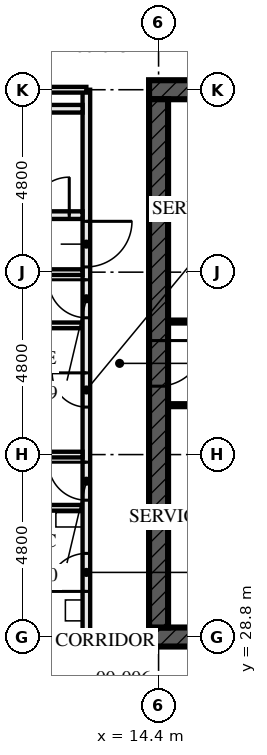
"""IFC4 building model, lengths in metres.
Left out: names, types, materials, properties, quantities, classifications, styles, units other than length and angle.
Written with IfcOpenShell. Run it as: python <this file> out.ifc"""

import sys

from ifc_helpers import new_model, si_unit, direction, frame, frame_2d, origin, place, context, subcontext, project, spatial, rectangle, extrude, element, fill, save


model = new_model("IFC4")
c1 = context("Model", 3, precision=1e-05, world=origin(), true_north=direction((0.0, 1.0)))
c2 = subcontext(c1, "Body", "Model", "MODEL_VIEW")
j1 = project(units=[si_unit("LENGTHUNIT", "METRE"), si_unit("PLANEANGLEUNIT", "RADIAN")], contexts=[c1])
p1 = place(None, origin())
s1 = spatial("IfcSite", under=j1, at=p1, CompositionType="ELEMENT")
p2 = place(p1, origin())
s2 = spatial("IfcBuilding", under=s1, at=p2, CompositionType="ELEMENT")
p3 = place(p2, origin())
s3 = spatial("IfcBuildingStorey", under=s2, at=p3, CompositionType="ELEMENT", Elevation=0.0)
p4 = place(p3, frame((14.15, 28.8, -1.8), z_axis=(0.0, 0.0, 1.0), x_axis=(1.0, 0.0, 0.0)))
e1 = element("IfcWall", 1, at=p4, inside=s3, PredefinedType="SHEAR", context=c2, shape_type="SweptSolid", body=[
    extrude(rectangle(XDim=14.9, YDim=0.5, at=frame_2d((7.45, 0.0))), origin(), (0.0, 0.0, 1.0), 6.13),
])
p5 = place(p4, frame((6.85, 0.0, 1.8)))
e2 = element("IfcOpeningElement", 2, at=p5, cuts=e1, PredefinedType="OPENING", context=c2, shape_type="SweptSolid", body=[
    extrude(rectangle(XDim=1.2, YDim=2.1, at=frame_2d((0.6, 1.05))), frame((0.0, 0.26, 0.0), z_axis=(0.0, -1.0, 0.0), x_axis=(1.0, 0.0, 0.0)), (0.0, 0.0, 1.0), 0.521),
])
p6 = place(p3, frame((29.05, 43.2, -1.8), z_axis=(0.0, 0.0, 1.0), x_axis=(-1.0, 0.0, 0.0)))
e3 = element("IfcWall", 3, at=p6, inside=s3, PredefinedType="SHEAR", context=c2, shape_type="SweptSolid", body=[
    extrude(rectangle(XDim=14.9, YDim=0.5, at=frame_2d((7.45, 0.0))), origin(), (0.0, 0.0, 1.0), 6.13),
])
p7 = place(p6, frame((6.85, 0.0, 1.8)))
e4 = element("IfcOpeningElement", 4, at=p7, cuts=e3, PredefinedType="OPENING", context=c2, shape_type="SweptSolid", body=[
    extrude(rectangle(XDim=1.2, YDim=2.1, at=frame_2d((0.6, 1.05))), frame((0.0, 0.26, 0.0), z_axis=(0.0, -1.0, 0.0), x_axis=(1.0, 0.0, 0.0)), (0.0, 0.0, 1.0), 0.521),
])
p8 = place(p3, frame((14.4, 42.95, -1.8), z_axis=(0.0, 0.0, 1.0), x_axis=(0.0, -1.0, 0.0)))
e5 = element("IfcWall", 5, at=p8, inside=s3, PredefinedType="SHEAR", context=c2, shape_type="SweptSolid", body=[
    extrude(rectangle(XDim=13.9, YDim=0.5, at=frame_2d((6.95, 0.0))), origin(), (0.0, 0.0, 1.0), 6.13),
])
p9 = place(p8, frame((6.35, 0.0, 1.8)))
e6 = element("IfcOpeningElement", 6, at=p9, cuts=e5, PredefinedType="OPENING", context=c2, shape_type="SweptSolid", body=[
    extrude(rectangle(XDim=1.2, YDim=2.1, at=frame_2d((0.6, 1.05))), frame((0.0, 0.26, 0.0), z_axis=(0.0, -1.0, 0.0), x_axis=(1.0, 0.0, 0.0)), (0.0, 0.0, 1.0), 0.521),
])
p10 = place(p3, frame((7.7, 42.7, 0.0), z_axis=(0.0, 0.0, 1.0), x_axis=(1.0, 0.0, 0.0)))
e7 = element("IfcWall", 7, at=p10, inside=s3, PredefinedType="SOLIDWALL", context=c2, shape_type="SweptSolid", body=[
    extrude(rectangle(XDim=4.7, YDim=0.2, at=frame_2d((2.35, 0.0))), origin(), (0.0, 0.0, 1.0), 3.99),
])
p11 = place(p3, frame((7.7, 39.9, 0.0), z_axis=(0.0, 0.0, 1.0), x_axis=(1.0, 0.0, 0.0)))
e8 = element("IfcWall", 8, at=p11, inside=s3, PredefinedType="SOLIDWALL", context=c2, shape_type="SweptSolid", body=[
    extrude(rectangle(XDim=4.7, YDim=0.2, at=frame_2d((2.35, 0.0))), origin(), (0.0, 0.0, 1.0), 3.99),
])
p12 = place(p11, frame((3.35, 0.0, 0.0)))
e9 = element("IfcOpeningElement", 9, at=p12, cuts=e8, PredefinedType="OPENING", context=c2, shape_type="SweptSolid", body=[
    extrude(rectangle(XDim=1.0, YDim=2.1, at=frame_2d((0.5, 1.05))), frame((0.0, 0.111, 0.0), z_axis=(0.0, -1.0, 0.0), x_axis=(1.0, 0.0, 0.0)), (0.0, 0.0, 1.0), 0.221),
])
for number, where, z_axis, x_axis in (
    (10, (9.8, 37.0, 0.0), (0.0, 0.0, 1.0), (1.0, 0.0, 0.0)),
    (11, (9.8, 32.2, 0.0), (0.0, 0.0, 1.0), (1.0, 0.0, 0.0)),
):
    element("IfcWall", number, at=place(p3, frame(where, z_axis=z_axis, x_axis=x_axis)), inside=s3, PredefinedType="PARTITIONING", context=c2, shape_type="SweptSolid", body=[
        extrude(rectangle(XDim=2.6, YDim=0.15, at=frame_2d((1.3, 0.0))), origin(), (0.0, 0.0, 1.0), 4.33),
    ])
for number, where, z_axis, x_axis in (
    (12, (0.395, 38.4, 0.0), (0.0, 0.0, 1.0), (1.0, 0.0, 0.0)),
    (13, (0.395, 33.6, 0.0), (0.0, 0.0, 1.0), (1.0, 0.0, 0.0)),
):
    element("IfcWall", number, at=place(p3, frame(where, z_axis=z_axis, x_axis=x_axis)), inside=s3, PredefinedType="PARTITIONING", context=c2, shape_type="SweptSolid", body=[
        extrude(rectangle(XDim=12.005, YDim=0.15, at=frame_2d((6.002, 0.0))), origin(), (0.0, 0.0, 1.0), 3.55),
    ])
p13 = place(p3, frame((12.5, 43.2, 0.0), z_axis=(0.0, 0.0, 1.0), x_axis=(0.0, -1.0, 0.0)))
e14 = element("IfcWall", 14, at=p13, inside=s3, PredefinedType="PARTITIONING", context=c2, shape_type="SweptSolid", body=[
    extrude(rectangle(XDim=14.4, YDim=0.2, at=frame_2d((7.2, 0.0))), origin(), (0.0, 0.0, 1.0), 3.55),
])
p14 = place(p13, frame((3.462, 0.0, 0.0)))
e15 = element("IfcOpeningElement", 15, at=p14, cuts=e14, PredefinedType="OPENING", context=c2, shape_type="SweptSolid", body=[
    extrude(rectangle(XDim=1.2, YDim=2.4, at=frame_2d((0.6, 1.2))), frame((0.0, 0.111, 0.0), z_axis=(0.0, -1.0, 0.0), x_axis=(1.0, 0.0, 0.0)), (0.0, 0.0, 1.0), 0.221),
])
p15 = place(p13, frame((5.0, 0.0, 0.0)))
e16 = element("IfcOpeningElement", 16, at=p15, cuts=e14, PredefinedType="OPENING", context=c2, shape_type="SweptSolid", body=[
    extrude(rectangle(XDim=1.0, YDim=2.4, at=frame_2d((0.5, 1.2))), frame((0.0, 0.111, 0.0), z_axis=(0.0, -1.0, 0.0), x_axis=(1.0, 0.0, 0.0)), (0.0, 0.0, 1.0), 0.221),
])
p16 = place(p13, frame((9.8, 0.0, 0.0)))
e17 = element("IfcOpeningElement", 17, at=p16, cuts=e14, PredefinedType="OPENING", context=c2, shape_type="SweptSolid", body=[
    extrude(rectangle(XDim=1.0, YDim=2.4, at=frame_2d((0.5, 1.2))), frame((0.0, 0.111, 0.0), z_axis=(0.0, -1.0, 0.0), x_axis=(1.0, 0.0, 0.0)), (0.0, 0.0, 1.0), 0.221),
])
p17 = place(p13, frame((7.45, 0.0, 0.0)))
e18 = element("IfcOpeningElement", 18, at=p17, cuts=e14, PredefinedType="OPENING", context=c2, shape_type="SweptSolid", body=[
    extrude(rectangle(XDim=0.9, YDim=2.1, at=frame_2d((0.45, 1.05))), frame((0.0, 0.111, 0.0), z_axis=(0.0, -1.0, 0.0), x_axis=(1.0, 0.0, 0.0)), (0.0, 0.0, 1.0), 0.221),
])
p18 = place(p13, frame((12.2, 0.0, 0.0)))
e19 = element("IfcOpeningElement", 19, at=p18, cuts=e14, PredefinedType="OPENING", context=c2, shape_type="SweptSolid", body=[
    extrude(rectangle(XDim=1.0, YDim=2.1, at=frame_2d((0.5, 1.05))), frame((0.0, 0.111, 0.0), z_axis=(0.0, -1.0, 0.0), x_axis=(1.0, 0.0, 0.0)), (0.0, 0.0, 1.0), 0.221),
])
p19 = place(p3, frame((14.65, 34.9, -1.8), z_axis=(0.0, 0.0, 1.0), x_axis=(1.0, 0.0, 0.0)))
e20 = element("IfcWall", 20, at=p19, inside=s3, PredefinedType="SOLIDWALL", context=c2, shape_type="SweptSolid", body=[
    extrude(rectangle(XDim=5.9, YDim=0.1, at=frame_2d((2.95, 0.0))), origin(), (0.0, 0.0, 1.0), 6.13),
])
p20 = place(p19, frame((1.6, 0.0, 1.8)))
e21 = element("IfcOpeningElement", 21, at=p20, cuts=e20, PredefinedType="OPENING", context=c2, shape_type="SweptSolid", body=[
    extrude(rectangle(XDim=0.7, YDim=2.1, at=frame_2d((0.35, 1.05))), frame((0.0, 0.061, 0.0), z_axis=(0.0, -1.0, 0.0), x_axis=(1.0, 0.0, 0.0)), (0.0, 0.0, 1.0), 0.121),
])
p21 = place(p3, frame((14.65, 37.1, -1.8), z_axis=(0.0, 0.0, 1.0), x_axis=(1.0, 0.0, 0.0)))
e22 = element("IfcWall", 22, at=p21, inside=s3, PredefinedType="SOLIDWALL", context=c2, shape_type="SweptSolid", body=[
    extrude(rectangle(XDim=5.9, YDim=0.1, at=frame_2d((2.95, 0.0))), origin(), (0.0, 0.0, 1.0), 6.13),
])
p22 = place(p21, frame((1.6, 0.0, 1.8)))
e23 = element("IfcOpeningElement", 23, at=p22, cuts=e22, PredefinedType="OPENING", context=c2, shape_type="SweptSolid", body=[
    extrude(rectangle(XDim=0.7, YDim=2.1, at=frame_2d((0.35, 1.05))), frame((0.0, 0.061, 0.0), z_axis=(0.0, -1.0, 0.0), x_axis=(1.0, 0.0, 0.0)), (0.0, 0.0, 1.0), 0.121),
])
for number, where, z_axis, x_axis in (
    (24, (12.5, 28.8, 0.0), (0.0, 0.0, 1.0), (-1.0, 0.0, 0.0)),
    (25, (12.5, 43.2, 0.0), (0.0, 0.0, 1.0), (-1.0, 0.0, 0.0)),
):
    element("IfcWall", number, at=place(p3, frame(where, z_axis=z_axis, x_axis=x_axis)), inside=s3, PredefinedType="PARTITIONING", context=c2, shape_type="SweptSolid", body=[
        extrude(rectangle(XDim=2.505, YDim=0.15, at=frame_2d((1.252, 0.0))), origin(), (0.0, 0.0, 1.0), 3.32),
    ])
p23 = place(p12, origin())
e26 = element("IfcDoor", 26, at=p23, inside=s3, OperationType="SINGLE_SWING_LEFT", PredefinedType="DOOR", context=c2, shape_type="SweptSolid", body=[
    extrude(rectangle(XDim=1.0, YDim=2.1, at=frame_2d((0.5, 1.05))), frame((0.0, 0.032, 0.0), z_axis=(0.0, -1.0, 0.0), x_axis=(1.0, 0.0, 0.0)), (0.0, 0.0, 1.0), 0.064),
])
fill(e9, e26)
p24 = place(p14, origin())
e27 = element("IfcDoor", 27, at=p24, inside=s3, OperationType="SINGLE_SWING_RIGHT", PredefinedType="DOOR", context=c2, shape_type="SweptSolid", body=[
    extrude(rectangle(XDim=1.2, YDim=2.4, at=frame_2d((0.6, 1.2))), frame((0.0, 0.027, 0.0), z_axis=(0.0, -1.0, 0.0), x_axis=(1.0, 0.0, 0.0)), (0.0, 0.0, 1.0), 0.054),
])
fill(e15, e27)
p25 = place(p15, frame((1.0, 0.0, 0.0), z_axis=(0.0, 0.0, 1.0), x_axis=(-1.0, 0.0, 0.0)))
e28 = element("IfcDoor", 28, at=p25, inside=s3, OperationType="SINGLE_SWING_LEFT", PredefinedType="DOOR", context=c2, shape_type="SweptSolid", body=[
    extrude(rectangle(XDim=1.0, YDim=2.4, at=frame_2d((0.5, 1.2))), frame((0.0, 0.027, 0.0), z_axis=(0.0, -1.0, 0.0), x_axis=(1.0, 0.0, 0.0)), (0.0, 0.0, 1.0), 0.054),
])
fill(e16, e28)
p26 = place(p16, frame((1.0, 0.0, 0.0), z_axis=(0.0, 0.0, 1.0), x_axis=(-1.0, 0.0, 0.0)))
e29 = element("IfcDoor", 29, at=p26, inside=s3, OperationType="SINGLE_SWING_LEFT", PredefinedType="DOOR", context=c2, shape_type="SweptSolid", body=[
    extrude(rectangle(XDim=1.0, YDim=2.4, at=frame_2d((0.5, 1.2))), frame((0.0, 0.027, 0.0), z_axis=(0.0, -1.0, 0.0), x_axis=(1.0, 0.0, 0.0)), (0.0, 0.0, 1.0), 0.054),
])
fill(e17, e29)
p27 = place(p17, frame((0.9, 0.0, 0.0), z_axis=(0.0, 0.0, 1.0), x_axis=(-1.0, 0.0, 0.0)))
e30 = element("IfcDoor", 30, at=p27, inside=s3, OperationType="SINGLE_SWING_LEFT", PredefinedType="DOOR", context=c2, shape_type="SweptSolid", body=[
    extrude(rectangle(XDim=0.9, YDim=2.1, at=frame_2d((0.45, 1.05))), frame((0.0, 0.027, 0.0), z_axis=(0.0, -1.0, 0.0), x_axis=(1.0, 0.0, 0.0)), (0.0, 0.0, 1.0), 0.054),
])
fill(e18, e30)
p28 = place(p18, frame((1.0, 0.0, 0.0), z_axis=(0.0, 0.0, 1.0), x_axis=(-1.0, 0.0, 0.0)))
e31 = element("IfcDoor", 31, at=p28, inside=s3, OperationType="SINGLE_SWING_RIGHT", PredefinedType="DOOR", context=c2, shape_type="SweptSolid", body=[
    extrude(rectangle(XDim=1.0, YDim=2.1, at=frame_2d((0.5, 1.05))), frame((0.0, 0.027, 0.0), z_axis=(0.0, -1.0, 0.0), x_axis=(1.0, 0.0, 0.0)), (0.0, 0.0, 1.0), 0.054),
])
fill(e19, e31)
p29 = place(p9, origin())
e32 = element("IfcDoor", 32, at=p29, inside=s3, OperationType="SINGLE_SWING_LEFT", PredefinedType="DOOR", context=c2, shape_type="SweptSolid", body=[
    extrude(rectangle(XDim=1.2, YDim=2.1, at=frame_2d((0.6, 1.05))), frame((0.0, 0.027, 0.0), z_axis=(0.0, -1.0, 0.0), x_axis=(1.0, 0.0, 0.0)), (0.0, 0.0, 1.0), 0.054),
])
fill(e6, e32)
save(model, sys.argv[1])
